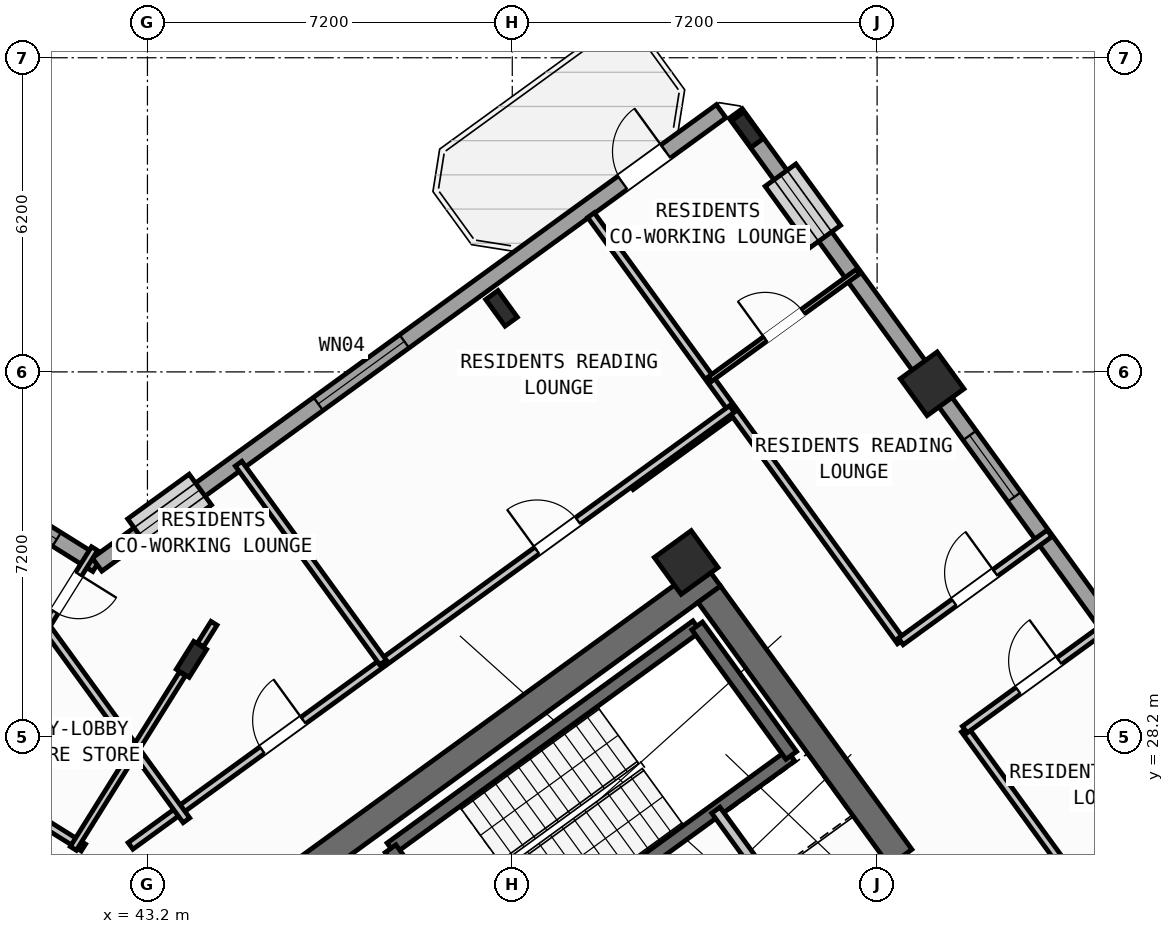
"""IFC4 building model, lengths in metres.
Left out: names, types, materials, properties, quantities, classifications, styles, units other than length and angle.
Written with IfcOpenShell. Run it as: python <this file> out.ifc"""

import sys

from ifc_helpers import new_model, si_unit, direction, frame, frame_2d, origin, origin_2d, place, context, subcontext, project, spatial, rectangle, hollow_rectangle, i_section, extrude, source, transform, mapped, element, fill, save


model = new_model("IFC4")
c1 = context("Model", 3, precision=1e-05, world=origin(), true_north=direction((0.0, 1.0)))
c2 = subcontext(c1, "Body", "Model", "MODEL_VIEW")
j1 = project(units=[si_unit("LENGTHUNIT", "METRE"), si_unit("PLANEANGLEUNIT", "RADIAN")], contexts=[c1])
p1 = place(None, origin())
s1 = spatial("IfcSite", under=j1, at=p1, CompositionType="ELEMENT")
p2 = place(p1, origin())
s2 = spatial("IfcBuilding", under=s1, at=p2, CompositionType="ELEMENT")
p3 = place(p2, frame((0.0, 0.0, 100.8)))
s3 = spatial("IfcBuildingStorey", under=s2, at=p3, CompositionType="ELEMENT", Elevation=100.8)
p4 = place(p3, frame((44.365, 24.142, 0.0), z_axis=(0.0, 0.0, 1.0), x_axis=(0.809024304885, 0.587775190107, 0.0)))
e1 = element("IfcWall", 1, at=p4, inside=s3, PredefinedType="SHEAR", context=c2, shape_type="SweptSolid", body=[
    extrude(rectangle(XDim=12.34, YDim=0.55, at=frame_2d((6.17, 0.0))), origin(), (0.0, 0.0, 1.0), 4.25),
])
p5 = place(p3, frame((58.064, 25.813, 0.0), z_axis=(0.0, 0.0, 1.0), x_axis=(-0.587764933797, 0.809031756236, 0.0)))
e2 = element("IfcWall", 2, at=p5, inside=s3, PredefinedType="SHEAR", context=c2, shape_type="SweptSolid", body=[
    extrude(rectangle(XDim=6.425, YDim=0.55, at=frame_2d((3.212, 0.0))), origin(), (0.0, 0.0, 1.0), 4.25),
])
m1 = source(origin(), c2, "Body", "SweptSolid", [
    extrude(i_section(OverallWidth=0.3, OverallDepth=0.65, WebThickness=0.016, FlangeThickness=0.031, at=origin_2d()), origin(), (0.0, 0.0, 1.0), 4.5),
])
p6 = place(p3, frame((44.068, 29.726, 0.0), z_axis=(0.0, 0.0, 1.0), x_axis=(-0.848048096156, 0.529919264233, 0.0)))
e3 = element("IfcColumn", 3, at=p6, inside=s3, PredefinedType="COLUMN", context=c2, shape_type="MappedRepresentation", body=[
    mapped(m1, transform((0.0, 0.0, 0.0), scale=1.0)),
])
m2 = source(origin(), c2, "Body", "SweptSolid", [
    extrude(hollow_rectangle(XDim=0.9, YDim=0.9, WallThickness=0.036, at=origin_2d()), origin(), (0.0, 0.0, 1.0), 4.5),
])
p7 = place(p3, frame((53.832, 31.638, 0.0), z_axis=(0.0, 0.0, 1.0), x_axis=(0.809016994375, 0.587785252292, 0.0)))
e4 = element("IfcColumn", 4, at=p7, inside=s3, PredefinedType="COLUMN", context=c2, shape_type="MappedRepresentation", body=[
    mapped(m2, transform((0.0, 0.0, 0.0), scale=1.0)),
])
p8 = place(p3, frame((50.188, 36.654, 0.0), z_axis=(0.0, 0.0, 1.0), x_axis=(0.809016994375, 0.587785252292, 0.0)))
e5 = element("IfcColumn", 5, at=p8, inside=s3, PredefinedType="COLUMN", context=c2, shape_type="MappedRepresentation", body=[
    mapped(m1, transform((0.0, 0.0, 0.0), scale=1.0)),
])
p9 = place(p3, frame((58.686, 35.165, 0.0), z_axis=(0.0, 0.0, 1.0), x_axis=(0.809016994375, 0.587785252292, 0.0)))
e6 = element("IfcColumn", 6, at=p9, inside=s3, PredefinedType="COLUMN", context=c2, shape_type="MappedRepresentation", body=[
    mapped(m2, transform((0.0, 0.0, 0.0), scale=1.0)),
])
p10 = place(p3, frame((55.042, 40.181, 0.0), z_axis=(0.0, 0.0, 1.0), x_axis=(0.809016994375, 0.587785252292, 0.0)))
e7 = element("IfcColumn", 7, at=p10, inside=s3, PredefinedType="COLUMN", context=c2, shape_type="MappedRepresentation", body=[
    mapped(m1, transform((0.0, 0.0, 0.0), scale=1.0)),
])
p11 = place(p3, frame((17.424, 47.083, 0.0), z_axis=(0.0, 0.0, 1.0), x_axis=(0.848049927979, -0.529916332693, 0.0)))
e8 = element("IfcWall", 8, at=p11, inside=s3, PredefinedType="STANDARD", context=c2, shape_type="SweptSolid", body=[
    extrude(rectangle(XDim=29.223, YDim=0.32, at=frame_2d((14.612, 0.0))), origin(), (0.0, 0.0, 1.0), 4.25),
])
p12 = place(p11, frame((10.072, 0.0, 0.0)))
e9 = element("IfcOpeningElement", 9, at=p12, cuts=e8, PredefinedType="OPENING", context=c2, shape_type="SweptSolid", body=[
    extrude(rectangle(XDim=1.05, YDim=2.15, at=frame_2d((0.525, 1.075))), frame((0.0, 0.17, 0.0), z_axis=(0.0, -1.0, 0.0), x_axis=(1.0, 0.0, 0.0)), (0.0, 0.0, 1.0), 0.34),
])
p13 = place(p11, frame((0.869, 0.0, 0.85)))
e10 = element("IfcOpeningElement", 10, at=p13, cuts=e8, PredefinedType="OPENING", context=c2, shape_type="SweptSolid", body=[
    extrude(rectangle(XDim=1.5, YDim=1.5, at=frame_2d((0.75, 0.75))), frame((0.0, 0.17, 0.0), z_axis=(0.0, -1.0, 0.0), x_axis=(1.0, 0.0, 0.0)), (0.0, 0.0, 1.0), 0.34),
])
p14 = place(p11, frame((3.981, 0.0, 0.85)))
e11 = element("IfcOpeningElement", 11, at=p14, cuts=e8, PredefinedType="OPENING", context=c2, shape_type="SweptSolid", body=[
    extrude(rectangle(XDim=1.5, YDim=1.5, at=frame_2d((0.75, 0.75))), frame((0.0, 0.17, 0.0), z_axis=(0.0, -1.0, 0.0), x_axis=(1.0, 0.0, 0.0)), (0.0, 0.0, 1.0), 0.34),
])
p15 = place(p11, frame((13.739, 0.0, 0.85)))
e12 = element("IfcOpeningElement", 12, at=p15, cuts=e8, PredefinedType="OPENING", context=c2, shape_type="SweptSolid", body=[
    extrude(rectangle(XDim=1.5, YDim=1.5, at=frame_2d((0.75, 0.75))), frame((0.0, 0.17, 0.0), z_axis=(0.0, -1.0, 0.0), x_axis=(1.0, 0.0, 0.0)), (0.0, 0.0, 1.0), 0.34),
])
p16 = place(p11, frame((21.114, 0.0, 0.65)))
e13 = element("IfcOpeningElement", 13, at=p16, cuts=e8, PredefinedType="OPENING", context=c2, shape_type="SweptSolid", body=[
    extrude(rectangle(XDim=2.8, YDim=2.1, at=frame_2d((1.4, 1.05))), frame((0.0, 0.17, 0.0), z_axis=(0.0, -1.0, 0.0), x_axis=(1.0, 0.0, 0.0)), (0.0, 0.0, 1.0), 0.34),
])
p17 = place(p11, frame((26.784, 0.0, 0.85)))
e14 = element("IfcOpeningElement", 14, at=p17, cuts=e8, PredefinedType="OPENING", context=c2, shape_type="SweptSolid", body=[
    extrude(rectangle(XDim=1.5, YDim=1.5, at=frame_2d((0.75, 0.75))), frame((0.0, 0.17, 0.0), z_axis=(0.0, -1.0, 0.0), x_axis=(1.0, 0.0, 0.0)), (0.0, 0.0, 1.0), 0.34),
])
p18 = place(p3, frame((42.207, 31.597, 0.0), z_axis=(0.0, 0.0, 1.0), x_axis=(0.809020333377, 0.587780656523, 0.0)))
e15 = element("IfcWall", 15, at=p18, inside=s3, PredefinedType="STANDARD", context=c2, shape_type="SweptSolid", body=[
    extrude(rectangle(XDim=15.223, YDim=0.32, at=frame_2d((7.611, 0.0))), origin(), (0.0, 0.0, 1.0), 4.25),
])
p19 = place(p18, frame((12.82, 0.0, 0.0)))
e16 = element("IfcOpeningElement", 16, at=p19, cuts=e15, PredefinedType="OPENING", context=c2, shape_type="SweptSolid", body=[
    extrude(rectangle(XDim=1.05, YDim=2.15, at=frame_2d((0.525, 1.075))), frame((0.0, 0.17, 0.0), z_axis=(0.0, -1.0, 0.0), x_axis=(1.0, 0.0, 0.0)), (0.0, 0.0, 1.0), 0.34),
])
p20 = place(p18, frame((1.018, 0.0, 0.85)))
e17 = element("IfcOpeningElement", 17, at=p20, cuts=e15, PredefinedType="OPENING", context=c2, shape_type="SweptSolid", body=[
    extrude(rectangle(XDim=1.5, YDim=1.5, at=frame_2d((0.75, 0.75))), frame((0.0, 0.17, 0.0), z_axis=(0.0, -1.0, 0.0), x_axis=(1.0, 0.0, 0.0)), (0.0, 0.0, 1.0), 0.34),
])
p21 = place(p18, frame((5.394, 0.0, 0.8)))
e18 = element("IfcOpeningElement", 18, at=p21, cuts=e15, PredefinedType="OPENING", context=c2, shape_type="SweptSolid", body=[
    extrude(rectangle(XDim=2.1, YDim=1.55, at=frame_2d((1.05, 0.775))), frame((0.0, 0.17, 0.0), z_axis=(0.0, -1.0, 0.0), x_axis=(1.0, 0.0, 0.0)), (0.0, 0.0, 1.0), 0.34),
])
p22 = place(p3, frame((54.81, 40.5, 0.0), z_axis=(0.0, 0.0, 1.0), x_axis=(0.587783625747, -0.809018176127, 0.0)))
e19 = element("IfcWall", 19, at=p22, inside=s3, PredefinedType="STANDARD", context=c2, shape_type="SweptSolid", body=[
    extrude(rectangle(XDim=21.587, YDim=0.32, at=frame_2d((10.794, 0.0))), origin(), (0.0, 0.0, 1.0), 3.675),
])
p23 = place(p22, frame((1.503, 0.0, 0.85)))
e20 = element("IfcOpeningElement", 20, at=p23, cuts=e19, PredefinedType="OPENING", context=c2, shape_type="SweptSolid", body=[
    extrude(rectangle(XDim=1.5, YDim=1.5, at=frame_2d((0.75, 0.75))), frame((0.0, 0.17, 0.0), z_axis=(0.0, -1.0, 0.0), x_axis=(1.0, 0.0, 0.0)), (0.0, 0.0, 1.0), 0.34),
])
p24 = place(p22, frame((7.854, 0.0, 0.85)))
e21 = element("IfcOpeningElement", 21, at=p24, cuts=e19, PredefinedType="OPENING", context=c2, shape_type="SweptSolid", body=[
    extrude(rectangle(XDim=1.5, YDim=1.5, at=frame_2d((0.75, 0.75))), frame((0.0, 0.17, 0.0), z_axis=(0.0, -1.0, 0.0), x_axis=(1.0, 0.0, 0.0)), (0.0, 0.0, 1.0), 0.34),
])
p25 = place(p22, frame((15.417, 0.0, 0.85)))
e22 = element("IfcOpeningElement", 22, at=p25, cuts=e19, PredefinedType="OPENING", context=c2, shape_type="SweptSolid", body=[
    extrude(rectangle(XDim=1.5, YDim=1.5, at=frame_2d((0.75, 0.75))), frame((0.0, 0.17, 0.0), z_axis=(0.0, -1.0, 0.0), x_axis=(1.0, 0.0, 0.0)), (0.0, 0.0, 1.0), 0.34),
])
p26 = place(p3, frame((48.006, 25.996, 0.0), z_axis=(0.0, 0.0, 1.0), x_axis=(0.80901903764, 0.587782439969, 0.0)))
e23 = element("IfcWall", 23, at=p26, inside=s3, PredefinedType="SHEAR", context=c2, shape_type="SweptSolid", body=[
    extrude(rectangle(XDim=7.46, YDim=0.26, at=frame_2d((3.73, 0.0))), origin(), (0.0, 0.0, 1.0), 4.25),
])
p27 = place(p3, frame((49.863, 23.44, 0.0), z_axis=(0.0, 0.0, 1.0), x_axis=(0.809003474932, 0.587803859759, 0.0)))
e24 = element("IfcWall", 24, at=p27, inside=s3, PredefinedType="SHEAR", context=c2, shape_type="SweptSolid", body=[
    extrude(rectangle(XDim=7.46, YDim=0.26, at=frame_2d((3.73, 0.0))), origin(), (0.0, 0.0, 1.0), 4.25),
])
p28 = place(p27, frame((0.36, 0.0, 0.0)))
e25 = element("IfcOpeningElement", 25, at=p28, cuts=e24, PredefinedType="OPENING", context=c2, shape_type="SweptSolid", body=[
    extrude(rectangle(XDim=0.86, YDim=2.05, at=frame_2d((0.43, 1.025))), frame((0.0, 0.14, 0.0), z_axis=(0.0, -1.0, 0.0), x_axis=(1.0, 0.0, 0.0)), (0.0, 0.0, 1.0), 0.28),
])
p29 = place(p3, frame((49.855, 23.434, 0.0), z_axis=(0.0, 0.0, 1.0), x_axis=(-0.58776738483, 0.809029975545, 0.0)))
e26 = element("IfcWall", 26, at=p29, inside=s3, PredefinedType="SHEAR", context=c2, shape_type="SweptSolid", body=[
    extrude(rectangle(XDim=3.16, YDim=0.26, at=frame_2d((1.58, 0.0))), origin(), (0.0, 0.0, 1.0), 4.25),
])
p30 = place(p3, frame((55.906, 27.831, 0.0), z_axis=(0.0, 0.0, 1.0), x_axis=(-0.587804123638, 0.809003283204, 0.0)))
e27 = element("IfcWall", 27, at=p30, inside=s3, PredefinedType="SHEAR", context=c2, shape_type="SweptSolid", body=[
    extrude(rectangle(XDim=3.16, YDim=0.26, at=frame_2d((1.58, 0.0))), origin(), (0.0, 0.0, 1.0), 4.25),
])
p31 = place(p3, frame((56.111, 24.419, 0.0), z_axis=(0.0, 0.0, 1.0), x_axis=(-0.58777848983, 0.809021907548, 0.0)))
e28 = element("IfcWall", 28, at=p31, inside=s3, PredefinedType="STANDARD", context=c2, shape_type="SweptSolid", body=[
    extrude(rectangle(XDim=2.88, YDim=0.2, at=frame_2d((1.44, 0.0))), origin(), (0.0, 0.0, 1.0), 4.24),
])
p32 = place(p3, frame((41.936, 26.012, 0.0), z_axis=(0.0, 0.0, 1.0), x_axis=(-0.848051154596, 0.529914369676, 0.0)))
e29 = element("IfcWall", 29, at=p32, inside=s3, PredefinedType="PARTITIONING", context=c2, shape_type="SweptSolid", body=[
    extrude(rectangle(XDim=15.57, YDim=0.16, at=frame_2d((7.785, 0.0))), origin(), (0.0, 0.0, 1.0), 4.24),
])
p33 = place(p32, frame((4.1, 0.0, 0.0)))
e30 = element("IfcOpeningElement", 30, at=p33, cuts=e29, PredefinedType="OPENING", context=c2, shape_type="SweptSolid", body=[
    extrude(rectangle(XDim=0.96, YDim=2.08, at=frame_2d((0.48, 1.04))), frame((0.0, 0.09, 0.0), z_axis=(0.0, -1.0, 0.0), x_axis=(1.0, 0.0, 0.0)), (0.0, 0.0, 1.0), 0.18),
])
p34 = place(p32, frame((8.2, 0.0, 0.0)))
e31 = element("IfcOpeningElement", 31, at=p34, cuts=e29, PredefinedType="OPENING", context=c2, shape_type="SweptSolid", body=[
    extrude(rectangle(XDim=1.7, YDim=2.2, at=frame_2d((0.85, 1.1))), frame((0.0, 0.09, 0.0), z_axis=(0.0, -1.0, 0.0), x_axis=(1.0, 0.0, 0.0)), (0.0, 0.0, 1.0), 0.18),
])
p35 = place(p3, frame((42.156, 31.912, 0.0), z_axis=(0.0, 0.0, 1.0), x_axis=(-0.529943141103, -0.848033175765, 0.0)))
e32 = element("IfcWall", 32, at=p35, inside=s3, PredefinedType="PLUMBINGWALL", context=c2, shape_type="SweptSolid", body=[
    extrude(rectangle(XDim=2.753, YDim=0.14, at=frame_2d((1.376, 0.0))), origin(), (0.0, 0.0, 1.0), 3.735),
])
p36 = place(p35, frame((0.593, 0.0, 0.0)))
e33 = element("IfcOpeningElement", 33, at=p36, cuts=e32, PredefinedType="OPENING", context=c2, shape_type="SweptSolid", body=[
    extrude(rectangle(XDim=0.88, YDim=2.08, at=frame_2d((0.44, 1.04))), frame((0.0, 0.08, 0.0), z_axis=(0.0, -1.0, 0.0), x_axis=(1.0, 0.0, 0.0)), (0.0, 0.0, 1.0), 0.16),
])
p37 = place(p3, frame((44.514, 30.439, 0.0), z_axis=(0.0, 0.0, 1.0), x_axis=(-0.529824479439, -0.848107316905, 0.0)))
e34 = element("IfcWall", 34, at=p37, inside=s3, PredefinedType="PLUMBINGWALL", context=c2, shape_type="SweptSolid", body=[
    extrude(rectangle(XDim=0.503, YDim=0.14, at=frame_2d((0.251, 0.0))), origin(), (0.0, 0.0, 1.0), 4.24),
])
p38 = place(p3, frame((43.89, 29.44, 0.0), z_axis=(0.0, 0.0, 1.0), x_axis=(-0.529928721319, -0.84804218664, 0.0)))
e35 = element("IfcWall", 35, at=p38, inside=s3, PredefinedType="PLUMBINGWALL", context=c2, shape_type="SweptSolid", body=[
    extrude(rectangle(XDim=4.063, YDim=0.14, at=frame_2d((2.031, 0.0))), origin(), (0.0, 0.0, 1.0), 3.675),
])
p39 = place(p3, frame((52.739, 33.143, 0.0), z_axis=(0.0, 0.0, 1.0), x_axis=(0.809000999347, 0.58780726693, 0.0)))
e36 = element("IfcWall", 36, at=p39, inside=s3, PredefinedType="PARTITIONING", context=c2, shape_type="SweptSolid", body=[
    extrude(rectangle(XDim=2.51, YDim=0.16, at=frame_2d((1.255, 0.0))), origin(), (0.0, 0.0, 1.0), 4.24),
])
p40 = place(p3, frame((64.709, 20.938, 0.0), z_axis=(0.0, 0.0, 1.0), x_axis=(-0.587776590479, 0.80902328748, 0.0)))
e37 = element("IfcWall", 37, at=p40, inside=s3, PredefinedType="PARTITIONING", context=c2, shape_type="SweptSolid", body=[
    extrude(rectangle(XDim=9.15, YDim=0.16, at=frame_2d((4.575, 0.0))), origin(), (0.0, 0.0, 1.0), 4.24),
])
p41 = place(p3, frame((58.067, 30.08, 0.0), z_axis=(0.0, 0.0, 1.0), x_axis=(-0.587787785243, 0.809015154073, 0.0)))
e38 = element("IfcWall", 38, at=p41, inside=s3, PredefinedType="PARTITIONING", context=c2, shape_type="SweptSolid", body=[
    extrude(rectangle(XDim=10.4, YDim=0.16, at=frame_2d((5.2, 0.0))), origin(), (0.0, 0.0, 1.0), 4.24),
])
p42 = place(p3, frame((59.331, 28.341, 0.0), z_axis=(0.0, 0.0, 1.0), x_axis=(0.809003564202, 0.587803736896, 0.0)))
e39 = element("IfcWall", 39, at=p42, inside=s3, PredefinedType="PARTITIONING", context=c2, shape_type="SweptSolid", body=[
    extrude(rectangle(XDim=3.63, YDim=0.16, at=frame_2d((1.815, 0.0))), origin(), (0.0, 0.0, 1.0), 4.24),
])
p43 = place(p42, frame((1.305, 0.0, 0.0)))
e40 = element("IfcOpeningElement", 40, at=p43, cuts=e39, PredefinedType="OPENING", context=c2, shape_type="SweptSolid", body=[
    extrude(rectangle(XDim=1.0, YDim=2.1, at=frame_2d((0.5, 1.05))), frame((0.0, 0.09, 0.0), z_axis=(0.0, -1.0, 0.0), x_axis=(1.0, 0.0, 0.0)), (0.0, 0.0, 1.0), 0.18),
])
p44 = place(p3, frame((58.067, 30.08, 0.0), z_axis=(0.0, 0.0, 1.0), x_axis=(0.809012309495, 0.587791700422, 0.0)))
e41 = element("IfcWall", 41, at=p44, inside=s3, PredefinedType="PARTITIONING", context=c2, shape_type="SweptSolid", body=[
    extrude(rectangle(XDim=3.63, YDim=0.16, at=frame_2d((1.815, 0.0))), origin(), (0.0, 0.0, 1.0), 4.24),
])
p45 = place(p44, frame((1.305, 0.0, 0.0)))
e42 = element("IfcOpeningElement", 42, at=p45, cuts=e41, PredefinedType="OPENING", context=c2, shape_type="SweptSolid", body=[
    extrude(rectangle(XDim=1.0, YDim=2.1, at=frame_2d((0.5, 1.05))), frame((0.0, 0.09, 0.0), z_axis=(0.0, -1.0, 0.0), x_axis=(1.0, 0.0, 0.0)), (0.0, 0.0, 1.0), 0.18),
])
p46 = place(p3, frame((54.304, 35.259, 0.0), z_axis=(0.0, 0.0, 1.0), x_axis=(0.809005039917, 0.58780170584, 0.0)))
e43 = element("IfcWall", 43, at=p46, inside=s3, PredefinedType="PARTITIONING", context=c2, shape_type="SweptSolid", body=[
    extrude(rectangle(XDim=3.61, YDim=0.11, at=frame_2d((1.805, 0.0))), origin(), (0.0, 0.0, 1.0), 4.24),
])
p47 = place(p46, frame((1.345, 0.0, 0.0)))
e44 = element("IfcOpeningElement", 44, at=p47, cuts=e43, PredefinedType="OPENING", context=c2, shape_type="SweptSolid", body=[
    extrude(rectangle(XDim=0.92, YDim=2.08, at=frame_2d((0.46, 1.04))), frame((0.0, 0.065, 0.0), z_axis=(0.0, -1.0, 0.0), x_axis=(1.0, 0.0, 0.0)), (0.0, 0.0, 1.0), 0.13),
])
p48 = place(p3, frame((42.866, 26.044, 0.0), z_axis=(0.0, 0.0, 1.0), x_axis=(0.809020254154, 0.587780765566, 0.0)))
e45 = element("IfcWall", 45, at=p48, inside=s3, PredefinedType="PARTITIONING", context=c2, shape_type="SweptSolid", body=[
    extrude(rectangle(XDim=14.67, YDim=0.16, at=frame_2d((7.335, 0.0))), origin(), (0.0, 0.0, 1.0), 4.24),
])
p49 = place(p48, frame((3.215, 0.0, 0.0)))
e46 = element("IfcOpeningElement", 46, at=p49, cuts=e45, PredefinedType="OPENING", context=c2, shape_type="SweptSolid", body=[
    extrude(rectangle(XDim=1.0, YDim=2.1, at=frame_2d((0.5, 1.05))), frame((0.0, 0.09, 0.0), z_axis=(0.0, -1.0, 0.0), x_axis=(1.0, 0.0, 0.0)), (0.0, 0.0, 1.0), 0.18),
])
p50 = place(p48, frame((9.915, 0.0, 0.0)))
e47 = element("IfcOpeningElement", 47, at=p50, cuts=e45, PredefinedType="OPENING", context=c2, shape_type="SweptSolid", body=[
    extrude(rectangle(XDim=1.0, YDim=2.1, at=frame_2d((0.5, 1.05))), frame((0.0, 0.09, 0.0), z_axis=(0.0, -1.0, 0.0), x_axis=(1.0, 0.0, 0.0)), (0.0, 0.0, 1.0), 0.18),
])
p51 = place(p3, frame((43.969, 26.55, 0.0), z_axis=(0.0, 0.0, 1.0), x_axis=(-0.587776919386, 0.80902304852, 0.0)))
e48 = element("IfcWall", 48, at=p51, inside=s3, PredefinedType="PARTITIONING", context=c2, shape_type="SweptSolid", body=[
    extrude(rectangle(XDim=5.48, YDim=0.16, at=frame_2d((2.74, 0.0))), origin(), (0.0, 0.0, 1.0), 4.24),
])
p52 = place(p3, frame((47.849, 29.665, 0.0), z_axis=(0.0, 0.0, 1.0), x_axis=(-0.587785532001, 0.809016791155, 0.0)))
e49 = element("IfcWall", 49, at=p52, inside=s3, PredefinedType="PARTITIONING", context=c2, shape_type="SweptSolid", body=[
    extrude(rectangle(XDim=4.85, YDim=0.16, at=frame_2d((2.425, 0.0))), origin(), (0.0, 0.0, 1.0), 4.24),
])
m3 = source(origin(), c2, "Body", "SweptSolid", [
    extrude(rectangle(XDim=1.05, YDim=2.15, at=frame_2d((0.525, 1.075))), frame((0.0, 0.025, 0.0), z_axis=(0.0, -1.0, 0.0), x_axis=(1.0, 0.0, 0.0)), (0.0, 0.0, 1.0), 0.05),
])
p53 = place(p19, origin())
e50 = element("IfcDoor", 50, at=p53, inside=s3, OperationType="SINGLE_SWING_RIGHT", PredefinedType="DOOR", context=c2, shape_type="MappedRepresentation", body=[
    mapped(m3, transform((0.0, 0.0, 0.0), scale=1.0)),
])
fill(e16, e50)
m4 = source(origin(), c2, "Body", "SweptSolid", [
    extrude(rectangle(XDim=1.5, YDim=1.5, at=frame_2d((0.75, 0.75))), frame((0.0, 0.03, 0.0), z_axis=(0.0, -1.0, 0.0), x_axis=(1.0, 0.0, 0.0)), (0.0, 0.0, 1.0), 0.06),
])
p54 = place(p17, origin())
e51 = element("IfcWindow", 51, at=p54, inside=s3, PartitioningType="SINGLE_PANEL", PredefinedType="WINDOW", context=c2, shape_type="MappedRepresentation", body=[
    mapped(m4, transform((0.0, 0.0, 0.0), scale=1.0)),
])
fill(e14, e51)
p55 = place(p20, origin())
e52 = element("IfcWindow", 52, at=p55, inside=s3, PartitioningType="SINGLE_PANEL", PredefinedType="WINDOW", context=c2, shape_type="MappedRepresentation", body=[
    mapped(m4, transform((0.0, 0.0, 0.0), scale=1.0)),
])
fill(e17, e52)
m5 = source(origin(), c2, "Body", "SweptSolid", [
    extrude(rectangle(XDim=2.1, YDim=1.55, at=frame_2d((1.05, 0.775))), frame((0.0, 0.03, 0.0), z_axis=(0.0, -1.0, 0.0), x_axis=(1.0, 0.0, 0.0)), (0.0, 0.0, 1.0), 0.06),
])
p56 = place(p21, origin())
e53 = element("IfcWindow", 53, at=p56, inside=s3, PartitioningType="SINGLE_PANEL", PredefinedType="WINDOW", context=c2, shape_type="MappedRepresentation", body=[
    mapped(m5, transform((0.0, 0.0, 0.0), scale=1.0)),
])
fill(e18, e53)
p57 = place(p23, origin())
e54 = element("IfcWindow", 54, at=p57, inside=s3, PartitioningType="SINGLE_PANEL", PredefinedType="WINDOW", context=c2, shape_type="MappedRepresentation", body=[
    mapped(m4, transform((0.0, 0.0, 0.0), scale=1.0)),
])
fill(e20, e54)
p58 = place(p24, origin())
e55 = element("IfcWindow", 55, at=p58, inside=s3, PartitioningType="SINGLE_PANEL", PredefinedType="WINDOW", context=c2, shape_type="MappedRepresentation", body=[
    mapped(m4, transform((0.0, 0.0, 0.0), scale=1.0)),
])
fill(e21, e55)
m6 = source(origin(), c2, "Body", "SweptSolid", [
    extrude(rectangle(XDim=0.88, YDim=2.08, at=frame_2d((0.44, 1.04))), frame((0.0, 0.025, 0.0), z_axis=(0.0, -1.0, 0.0), x_axis=(1.0, 0.0, 0.0)), (0.0, 0.0, 1.0), 0.05),
])
p59 = place(p36, origin())
e56 = element("IfcDoor", 56, at=p59, inside=s3, OperationType="SINGLE_SWING_LEFT", PredefinedType="DOOR", context=c2, shape_type="MappedRepresentation", body=[
    mapped(m6, transform((0.0, 0.0, 0.0), scale=1.0)),
])
fill(e33, e56)
m7 = source(origin(), c2, "Body", "SweptSolid", [
    extrude(rectangle(XDim=1.0, YDim=2.1, at=frame_2d((0.5, 1.05))), frame((0.0, 0.025, 0.0), z_axis=(0.0, -1.0, 0.0), x_axis=(1.0, 0.0, 0.0)), (0.0, 0.0, 1.0), 0.05),
])
p60 = place(p45, origin())
e57 = element("IfcDoor", 57, at=p60, inside=s3, OperationType="SINGLE_SWING_RIGHT", PredefinedType="DOOR", context=c2, shape_type="MappedRepresentation", body=[
    mapped(m7, transform((0.0, 0.0, 0.0), scale=1.0)),
])
fill(e42, e57)
m8 = source(origin(), c2, "Body", "SweptSolid", [
    extrude(rectangle(XDim=0.92, YDim=2.08, at=frame_2d((0.46, 1.04))), frame((0.0, 0.025, 0.0), z_axis=(0.0, -1.0, 0.0), x_axis=(1.0, 0.0, 0.0)), (0.0, 0.0, 1.0), 0.05),
])
p61 = place(p47, origin())
e58 = element("IfcDoor", 58, at=p61, inside=s3, OperationType="SINGLE_SWING_LEFT", PredefinedType="DOOR", context=c2, shape_type="MappedRepresentation", body=[
    mapped(m8, transform((0.0, 0.0, 0.0), scale=1.0)),
])
fill(e44, e58)
p62 = place(p43, origin())
e59 = element("IfcDoor", 59, at=p62, inside=s3, OperationType="SINGLE_SWING_RIGHT", PredefinedType="DOOR", context=c2, shape_type="MappedRepresentation", body=[
    mapped(m7, transform((0.0, 0.0, 0.0), scale=1.0)),
])
fill(e40, e59)
p63 = place(p49, origin())
e60 = element("IfcDoor", 60, at=p63, inside=s3, OperationType="SINGLE_SWING_RIGHT", PredefinedType="DOOR", context=c2, shape_type="MappedRepresentation", body=[
    mapped(m7, transform((0.0, 0.0, 0.0), scale=1.0)),
])
fill(e46, e60)
p64 = place(p50, origin())
e61 = element("IfcDoor", 61, at=p64, inside=s3, OperationType="SINGLE_SWING_LEFT", PredefinedType="DOOR", context=c2, shape_type="MappedRepresentation", body=[
    mapped(m7, transform((0.0, 0.0, 0.0), scale=1.0)),
])
fill(e47, e61)
save(model, sys.argv[1])
